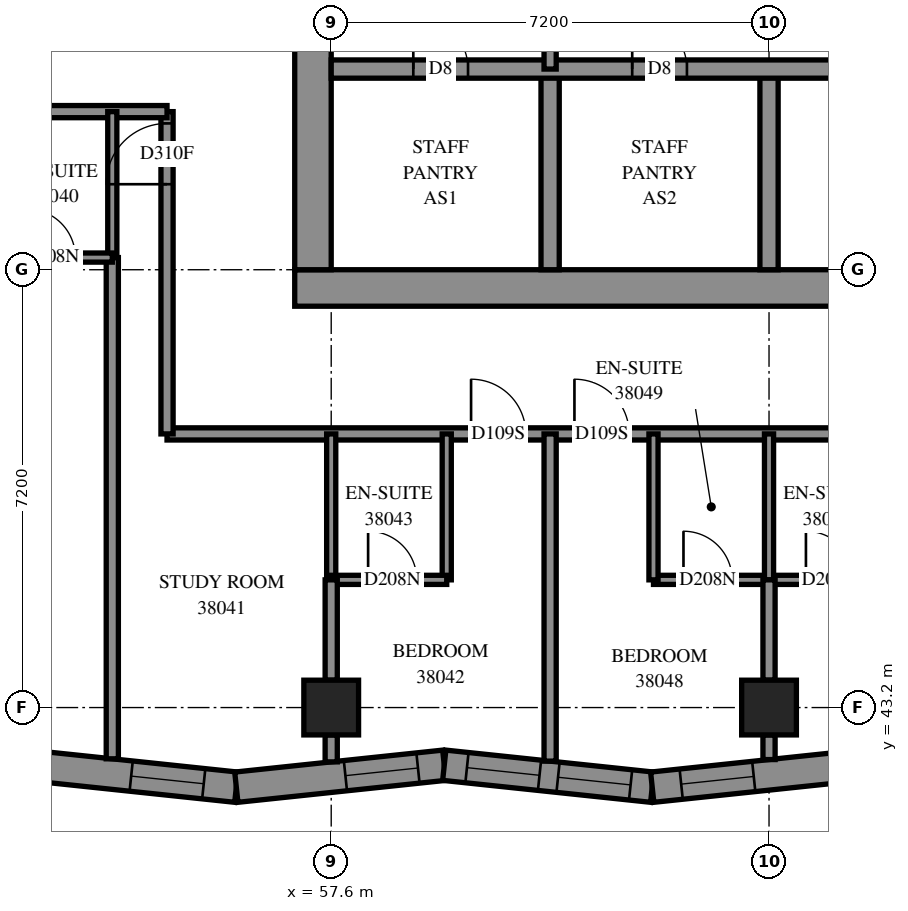
"""IFC4 building model, lengths in metres.
Left out: names, types, materials, properties, quantities, classifications, styles, units other than length and angle.
Written with IfcOpenShell. Run it as: python <this file> out.ifc"""

import sys

from ifc_helpers import new_model, si_unit, direction, frame, frame_2d, origin, origin_2d, place, context, subcontext, project, spatial, polyline, rectangle, outline, extrude, element, fill, save


model = new_model("IFC4")
c1 = context("Model", 3, precision=1e-05, world=origin(), true_north=direction((0.0, 1.0)))
c2 = subcontext(c1, "Body", "Model", "MODEL_VIEW")
j1 = project(units=[si_unit("LENGTHUNIT", "METRE"), si_unit("PLANEANGLEUNIT", "RADIAN")], contexts=[c1])
p1 = place(None, origin())
s1 = spatial("IfcSite", under=j1, at=p1, CompositionType="ELEMENT")
p2 = place(p1, origin())
s2 = spatial("IfcBuilding", under=s1, at=p2, CompositionType="ELEMENT")
p3 = place(p2, frame((0.0, 0.0, 142.2)))
s3 = spatial("IfcBuildingStorey", under=s2, at=p3, CompositionType="ELEMENT", Elevation=142.2)
for number, where, z_axis, x_axis in (
    (1, (57.6, 43.2, 0.0), (0.0, 0.0, 1.0), (1.0, 0.0, 0.0)),
    (2, (64.8, 43.2, 0.0), (0.0, 0.0, 1.0), (1.0, 0.0, 0.0)),
):
    element("IfcColumn", number, at=place(p3, frame(where, z_axis=z_axis, x_axis=x_axis)), inside=s3, PredefinedType="COLUMN", context=c2, shape_type="SweptSolid", body=[
        extrude(rectangle(XDim=0.9, YDim=0.9, at=origin_2d()), origin(), (0.0, 0.0, 1.0), 3.1),
    ])
p4 = place(p3, frame((57.0, 50.1, -0.3), z_axis=(0.0, 0.0, 1.0), x_axis=(1.0, 0.0, 0.0)))
e3 = element("IfcWall", 3, at=p4, inside=s3, PredefinedType="SHEAR", context=c2, shape_type="SweptSolid", body=[
    extrude(rectangle(XDim=15.6, YDim=0.6, at=frame_2d((7.8, 0.0))), origin(), (0.0, 0.0, 1.0), 2.7),
])
p5 = place(p3, frame((57.3, 50.4, -0.3), z_axis=(0.0, 0.0, 1.0), x_axis=(0.0, 1.0, 0.0)))
e4 = element("IfcWall", 4, at=p5, inside=s3, PredefinedType="SHEAR", context=c2, shape_type="SweptSolid", body=[
    extrude(rectangle(XDim=14.4, YDim=0.6, at=frame_2d((7.2, 0.0))), origin(), (0.0, 0.0, 1.0), 2.7),
])
p6 = place(p5, frame((4.55, 0.0, 0.3)))
e5 = element("IfcOpeningElement", 5, at=p6, cuts=e4, PredefinedType="OPENING", context=c2, shape_type="SweptSolid", body=[
    extrude(rectangle(XDim=1.1, YDim=2.1, at=frame_2d((0.55, 1.05))), frame((0.0, 0.31, 0.0), z_axis=(0.0, -1.0, 0.0), x_axis=(1.0, 0.0, 0.0)), (0.0, 0.0, 1.0), 0.62),
])
p7 = place(p5, frame((11.35, 0.0, 0.3)))
e6 = element("IfcOpeningElement", 6, at=p7, cuts=e4, PredefinedType="OPENING", context=c2, shape_type="SweptSolid", body=[
    extrude(rectangle(XDim=1.1, YDim=2.1, at=frame_2d((0.55, 1.05))), frame((0.0, 0.31, 0.0), z_axis=(0.0, -1.0, 0.0), x_axis=(1.0, 0.0, 0.0)), (0.0, 0.0, 1.0), 0.62),
])
for number, where, z_axis, x_axis in (
    (7, (61.2, 50.4, 0.0), (0.0, 0.0, 1.0), (0.0, 1.0, 0.0)),
    (8, (64.8, 50.4, 0.0), (0.0, 0.0, 1.0), (0.0, 1.0, 0.0)),
):
    element("IfcWall", number, at=place(p3, frame(where, z_axis=z_axis, x_axis=x_axis)), inside=s3, PredefinedType="SOLIDWALL", context=c2, shape_type="SweptSolid", body=[
        extrude(rectangle(XDim=3.3, YDim=0.3, at=frame_2d((1.65, 0.0))), origin(), (0.0, 0.0, 1.0), 3.1),
    ])
p8 = place(p3, frame((57.6, 53.7, 0.0), z_axis=(0.0, 0.0, 1.0), x_axis=(1.0, 0.0, 0.0)))
e9 = element("IfcWall", 9, at=p8, inside=s3, PredefinedType="SOLIDWALL", context=c2, shape_type="SweptSolid", body=[
    extrude(rectangle(XDim=14.4, YDim=0.3, at=frame_2d((7.2, 0.0))), origin(), (0.0, 0.0, 1.0), 3.1),
])
p9 = place(p8, frame((1.35, 0.0, 0.0)))
e10 = element("IfcOpeningElement", 10, at=p9, cuts=e9, PredefinedType="OPENING", context=c2, shape_type="SweptSolid", body=[
    extrude(rectangle(XDim=0.9, YDim=2.1, at=frame_2d((0.45, 1.05))), frame((0.0, 0.16, 0.0), z_axis=(0.0, -1.0, 0.0), x_axis=(1.0, 0.0, 0.0)), (0.0, 0.0, 1.0), 0.32),
])
p10 = place(p8, frame((4.95, 0.0, 0.0)))
e11 = element("IfcOpeningElement", 11, at=p10, cuts=e9, PredefinedType="OPENING", context=c2, shape_type="SweptSolid", body=[
    extrude(rectangle(XDim=0.9, YDim=2.1, at=frame_2d((0.45, 1.05))), frame((0.0, 0.16, 0.0), z_axis=(0.0, -1.0, 0.0), x_axis=(1.0, 0.0, 0.0)), (0.0, 0.0, 1.0), 0.32),
])
p11 = place(p8, frame((8.55, 0.0, 0.0)))
e12 = element("IfcOpeningElement", 12, at=p11, cuts=e9, PredefinedType="OPENING", context=c2, shape_type="SweptSolid", body=[
    extrude(rectangle(XDim=0.9, YDim=2.1, at=frame_2d((0.45, 1.05))), frame((0.0, 0.16, 0.0), z_axis=(0.0, -1.0, 0.0), x_axis=(1.0, 0.0, 0.0)), (0.0, 0.0, 1.0), 0.32),
])
p12 = place(p8, frame((12.05, 0.0, 0.0)))
e13 = element("IfcOpeningElement", 13, at=p12, cuts=e9, PredefinedType="OPENING", context=c2, shape_type="SweptSolid", body=[
    extrude(rectangle(XDim=1.1, YDim=2.1, at=frame_2d((0.55, 1.05))), frame((0.0, 0.16, 0.0), z_axis=(0.0, -1.0, 0.0), x_axis=(1.0, 0.0, 0.0)), (0.0, 0.0, 1.0), 0.32),
])
p13 = place(p3, frame((52.598, 42.254, 0.0), z_axis=(0.0, 0.0, 1.0), x_axis=(0.9944732608, -0.1049901591, 0.0)))
e14 = element("IfcWall", 14, at=p13, inside=s3, PredefinedType="SOLIDWALL", context=c2, shape_type="SweptSolid", body=[
    extrude(outline(polyline([(0.048, -0.25), (3.487, -0.25), (3.434, 0.25), (-0.048, 0.25), (0.048, -0.25)])), origin(), (0.0, 0.0, 1.0), 3.1),
])
p14 = place(p13, frame((1.722, 0.0, 0.45)))
e15 = element("IfcOpeningElement", 15, at=p14, cuts=e14, PredefinedType="OPENING", context=c2, shape_type="SweptSolid", body=[
    extrude(rectangle(XDim=1.2, YDim=2.5, at=frame_2d((0.6, 1.25))), frame((0.0, 0.26, 0.0), z_axis=(0.0, -1.0, 0.0), x_axis=(1.0, 0.0, 0.0)), (0.0, 0.0, 1.0), 0.52),
])
p15 = place(p3, frame((56.039, 41.89, 0.0), z_axis=(0.0, 0.0, 1.0), x_axis=(0.9944741767, 0.1049814831, 0.0)))
e16 = element("IfcWall", 16, at=p15, inside=s3, PredefinedType="SOLIDWALL", context=c2, shape_type="SweptSolid", body=[
    extrude(outline(polyline([(-0.026, -0.25), (3.412, -0.25), (3.465, 0.25), (0.026, 0.25), (-0.026, -0.25)])), origin(), (0.0, 0.0, 1.0), 3.1),
])
p16 = place(p15, frame((1.804, 0.0, 0.45)))
e17 = element("IfcOpeningElement", 17, at=p16, cuts=e16, PredefinedType="OPENING", context=c2, shape_type="SweptSolid", body=[
    extrude(rectangle(XDim=1.2, YDim=2.5, at=frame_2d((0.6, 1.25))), frame((0.0, 0.26, 0.0), z_axis=(0.0, -1.0, 0.0), x_axis=(1.0, 0.0, 0.0)), (0.0, 0.0, 1.0), 0.52),
])
p17 = place(p3, frame((59.459, 42.251, 0.0), z_axis=(0.0, 0.0, 1.0), x_axis=(0.9944741767, -0.1049814831, 0.0)))
e18 = element("IfcWall", 18, at=p17, inside=s3, PredefinedType="SOLIDWALL", context=c2, shape_type="SweptSolid", body=[
    extrude(outline(polyline([(0.026, -0.25), (3.465, -0.25), (3.412, 0.25), (-0.026, 0.25), (0.026, -0.25)])), origin(), (0.0, 0.0, 1.0), 3.1),
])
p18 = place(p17, frame((0.375, 0.0, 0.45)))
e19 = element("IfcOpeningElement", 19, at=p18, cuts=e18, PredefinedType="OPENING", context=c2, shape_type="SweptSolid", body=[
    extrude(rectangle(XDim=1.2, YDim=2.5, at=frame_2d((0.6, 1.25))), frame((0.0, 0.26, 0.0), z_axis=(0.0, -1.0, 0.0), x_axis=(1.0, 0.0, 0.0)), (0.0, 0.0, 1.0), 0.52),
])
p19 = place(p17, frame((1.881, 0.0, 0.45)))
e20 = element("IfcOpeningElement", 20, at=p19, cuts=e18, PredefinedType="OPENING", context=c2, shape_type="SweptSolid", body=[
    extrude(rectangle(XDim=1.2, YDim=2.5, at=frame_2d((0.6, 1.25))), frame((0.0, 0.26, 0.0), z_axis=(0.0, -1.0, 0.0), x_axis=(1.0, 0.0, 0.0)), (0.0, 0.0, 1.0), 0.52),
])
p20 = place(p3, frame((62.879, 41.89, 0.0), z_axis=(0.0, 0.0, 1.0), x_axis=(0.9944744972, 0.1049784471, 0.0)))
e21 = element("IfcWall", 21, at=p20, inside=s3, PredefinedType="SOLIDWALL", context=c2, shape_type="SweptSolid", body=[
    extrude(outline(polyline([(-0.026, -0.25), (3.412, -0.25), (3.465, 0.25), (0.026, 0.25), (-0.026, -0.25)])), origin(), (0.0, 0.0, 1.0), 3.1),
])
p21 = place(p20, frame((0.479, 0.0, 0.45)))
e22 = element("IfcOpeningElement", 22, at=p21, cuts=e21, PredefinedType="OPENING", context=c2, shape_type="SweptSolid", body=[
    extrude(rectangle(XDim=1.2, YDim=2.5, at=frame_2d((0.6, 1.25))), frame((0.0, 0.26, 0.0), z_axis=(0.0, -1.0, 0.0), x_axis=(1.0, 0.0, 0.0)), (0.0, 0.0, 1.0), 0.52),
])
p22 = place(p3, frame((61.2, 53.7, 0.0), z_axis=(0.0, 0.0, 1.0), x_axis=(0.0, 1.0, 0.0)))
e23 = element("IfcWall", 23, at=p22, inside=s3, PredefinedType="PARTITIONING", context=c2, shape_type="SweptSolid", body=[
    extrude(rectangle(XDim=3.6, YDim=0.2, at=frame_2d((1.8, 0.0))), origin(), (0.0, 0.0, 1.0), 3.1),
])
p23 = place(p3, frame((54.9, 47.7, 0.0), z_axis=(0.0, 0.0, 1.0), x_axis=(1.0, 0.0, 0.0)))
e24 = element("IfcWall", 24, at=p23, inside=s3, PredefinedType="PARTITIONING", context=c2, shape_type="SweptSolid", body=[
    extrude(rectangle(XDim=19.326, YDim=0.2, at=frame_2d((9.663, 0.0))), origin(), (0.0, 0.0, 1.0), 3.1),
])
p24 = place(p23, frame((5.0, 0.0, 0.0)))
e25 = element("IfcOpeningElement", 25, at=p24, cuts=e24, PredefinedType="OPENING", context=c2, shape_type="SweptSolid", body=[
    extrude(rectangle(XDim=0.9, YDim=2.1, at=frame_2d((0.45, 1.05))), frame((0.0, 0.11, 0.0), z_axis=(0.0, -1.0, 0.0), x_axis=(1.0, 0.0, 0.0)), (0.0, 0.0, 1.0), 0.22),
])
p25 = place(p23, frame((12.2, 0.0, 0.0)))
e26 = element("IfcOpeningElement", 26, at=p25, cuts=e24, PredefinedType="OPENING", context=c2, shape_type="SweptSolid", body=[
    extrude(rectangle(XDim=0.9, YDim=2.1, at=frame_2d((0.45, 1.05))), frame((0.0, 0.11, 0.0), z_axis=(0.0, -1.0, 0.0), x_axis=(1.0, 0.0, 0.0)), (0.0, 0.0, 1.0), 0.22),
])
p26 = place(p23, frame((6.7, 0.0, 0.0)))
e27 = element("IfcOpeningElement", 27, at=p26, cuts=e24, PredefinedType="OPENING", context=c2, shape_type="SweptSolid", body=[
    extrude(rectangle(XDim=0.9, YDim=2.1, at=frame_2d((0.45, 1.05))), frame((0.0, 0.11, 0.0), z_axis=(0.0, -1.0, 0.0), x_axis=(1.0, 0.0, 0.0)), (0.0, 0.0, 1.0), 0.22),
])
p27 = place(p23, frame((13.9, 0.0, 0.0)))
e28 = element("IfcOpeningElement", 28, at=p27, cuts=e24, PredefinedType="OPENING", context=c2, shape_type="SweptSolid", body=[
    extrude(rectangle(XDim=0.9, YDim=2.1, at=frame_2d((0.45, 1.05))), frame((0.0, 0.11, 0.0), z_axis=(0.0, -1.0, 0.0), x_axis=(1.0, 0.0, 0.0)), (0.0, 0.0, 1.0), 0.22),
])
p28 = place(p3, frame((54.0, 42.357, 0.0), z_axis=(0.0, 0.0, 1.0), x_axis=(0.0, 1.0, 0.0)))
e29 = element("IfcWall", 29, at=p28, inside=s3, PredefinedType="PARTITIONING", context=c2, shape_type="SweptSolid", body=[
    extrude(rectangle(XDim=8.243, YDim=0.2, at=frame_2d((4.122, 0.0))), origin(), (0.0, 0.0, 1.0), 3.1),
])
p29 = place(p3, frame((61.2, 42.319, 0.0), z_axis=(0.0, 0.0, 1.0), x_axis=(0.0, 1.0, 0.0)))
e30 = element("IfcWall", 30, at=p29, inside=s3, PredefinedType="PARTITIONING", context=c2, shape_type="SweptSolid", body=[
    extrude(rectangle(XDim=5.381, YDim=0.2, at=frame_2d((2.691, 0.0))), origin(), (0.0, 0.0, 1.0), 3.1),
])
p30 = place(p3, frame((54.9, 47.7, 0.0), z_axis=(0.0, 0.0, 1.0), x_axis=(0.0, 1.0, 0.0)))
e31 = element("IfcWall", 31, at=p30, inside=s3, PredefinedType="PARTITIONING", context=c2, shape_type="SweptSolid", body=[
    extrude(rectangle(XDim=5.3, YDim=0.2, at=frame_2d((2.65, 0.0))), origin(), (0.0, 0.0, 1.0), 3.1),
])
p31 = place(p30, frame((4.106, 0.0, 0.0)))
e32 = element("IfcOpeningElement", 32, at=p31, cuts=e31, PredefinedType="OPENING", context=c2, shape_type="SweptSolid", body=[
    extrude(rectangle(XDim=1.0, YDim=2.1, at=frame_2d((0.5, 1.05))), frame((0.0, 0.11, 0.0), z_axis=(0.0, -1.0, 0.0), x_axis=(1.0, 0.0, 0.0)), (0.0, 0.0, 1.0), 0.22),
])
p32 = place(p3, frame((50.4, 53.0, 0.0), z_axis=(0.0, 0.0, 1.0), x_axis=(1.0, 0.0, 0.0)))
e33 = element("IfcWall", 33, at=p32, inside=s3, PredefinedType="PARTITIONING", context=c2, shape_type="SweptSolid", body=[
    extrude(rectangle(XDim=4.5, YDim=0.2, at=frame_2d((2.25, 0.0))), origin(), (0.0, 0.0, 1.0), 3.1),
])
p33 = place(p32, frame((0.4, 0.0, 0.0)))
e34 = element("IfcOpeningElement", 34, at=p33, cuts=e33, PredefinedType="OPENING", context=c2, shape_type="SweptSolid", body=[
    extrude(rectangle(XDim=0.9, YDim=2.1, at=frame_2d((0.45, 1.05))), frame((0.0, 0.11, 0.0), z_axis=(0.0, -1.0, 0.0), x_axis=(1.0, 0.0, 0.0)), (0.0, 0.0, 1.0), 0.22),
])
p34 = place(p3, frame((62.9, 45.3, 0.0), z_axis=(0.0, 0.0, 1.0), x_axis=(1.0, 0.0, 0.0)))
e35 = element("IfcWall", 35, at=p34, inside=s3, PredefinedType="PARTITIONING", context=c2, shape_type="SweptSolid", body=[
    extrude(rectangle(XDim=3.8, YDim=0.15, at=frame_2d((1.9, 0.0))), origin(), (0.0, 0.0, 1.0), 3.1),
])
p35 = place(p34, frame((2.507, 0.0, 0.0)))
e36 = element("IfcOpeningElement", 36, at=p35, cuts=e35, PredefinedType="OPENING", context=c2, shape_type="SweptSolid", body=[
    extrude(rectangle(XDim=0.8, YDim=2.1, at=frame_2d((0.4, 1.05))), frame((0.0, 0.085, 0.0), z_axis=(0.0, -1.0, 0.0), x_axis=(1.0, 0.0, 0.0)), (0.0, 0.0, 1.0), 0.17),
])
p36 = place(p34, frame((0.493, 0.0, 0.0)))
e37 = element("IfcOpeningElement", 37, at=p36, cuts=e35, PredefinedType="OPENING", context=c2, shape_type="SweptSolid", body=[
    extrude(rectangle(XDim=0.8, YDim=2.1, at=frame_2d((0.4, 1.05))), frame((0.0, 0.085, 0.0), z_axis=(0.0, -1.0, 0.0), x_axis=(1.0, 0.0, 0.0)), (0.0, 0.0, 1.0), 0.17),
])
for number, where, z_axis, x_axis in (
    (38, (59.5, 45.3, 0.0), (0.0, 0.0, 1.0), (0.0, 1.0, 0.0)),
    (39, (57.6, 45.3, 0.0), (0.0, 0.0, 1.0), (0.0, 1.0, 0.0)),
    (40, (62.9, 45.3, 0.0), (0.0, 0.0, 1.0), (0.0, 1.0, 0.0)),
    (41, (64.8, 45.3, 0.0), (0.0, 0.0, 1.0), (0.0, 1.0, 0.0)),
    (42, (54.0, 50.6, 0.0), (0.0, 0.0, 1.0), (0.0, 1.0, 0.0)),
):
    element("IfcWall", number, at=place(p3, frame(where, z_axis=z_axis, x_axis=x_axis)), inside=s3, PredefinedType="PARTITIONING", context=c2, shape_type="SweptSolid", body=[
        extrude(rectangle(XDim=2.4, YDim=0.15, at=frame_2d((1.2, 0.0))), origin(), (0.0, 0.0, 1.0), 3.1),
    ])
p37 = place(p3, frame((52.1, 50.6, 0.0), z_axis=(0.0, 0.0, 1.0), x_axis=(1.0, 0.0, 0.0)))
e43 = element("IfcWall", 43, at=p37, inside=s3, PredefinedType="PARTITIONING", context=c2, shape_type="SweptSolid", body=[
    extrude(rectangle(XDim=1.9, YDim=0.15, at=frame_2d((0.95, 0.0))), origin(), (0.0, 0.0, 1.0), 3.1),
])
p38 = place(p37, frame((0.493, 0.0, 0.0)))
e44 = element("IfcOpeningElement", 44, at=p38, cuts=e43, PredefinedType="OPENING", context=c2, shape_type="SweptSolid", body=[
    extrude(rectangle(XDim=0.8, YDim=2.1, at=frame_2d((0.4, 1.05))), frame((0.0, 0.085, 0.0), z_axis=(0.0, -1.0, 0.0), x_axis=(1.0, 0.0, 0.0)), (0.0, 0.0, 1.0), 0.17),
])
p39 = place(p3, frame((57.6, 45.3, 0.0), z_axis=(0.0, 0.0, 1.0), x_axis=(1.0, 0.0, 0.0)))
e45 = element("IfcWall", 45, at=p39, inside=s3, PredefinedType="PARTITIONING", context=c2, shape_type="SweptSolid", body=[
    extrude(rectangle(XDim=1.9, YDim=0.15, at=frame_2d((0.95, 0.0))), origin(), (0.0, 0.0, 1.0), 3.1),
])
p40 = place(p39, frame((0.607, 0.0, 0.0)))
e46 = element("IfcOpeningElement", 46, at=p40, cuts=e45, PredefinedType="OPENING", context=c2, shape_type="SweptSolid", body=[
    extrude(rectangle(XDim=0.8, YDim=2.1, at=frame_2d((0.4, 1.05))), frame((0.0, 0.085, 0.0), z_axis=(0.0, -1.0, 0.0), x_axis=(1.0, 0.0, 0.0)), (0.0, 0.0, 1.0), 0.17),
])
for number, where, z_axis, x_axis in (
    (47, (57.6, 43.65, 0.0), (0.0, 0.0, 1.0), (0.0, 1.0, 0.0)),
    (48, (64.8, 43.65, 0.0), (0.0, 0.0, 1.0), (0.0, 1.0, 0.0)),
):
    element("IfcWall", number, at=place(p3, frame(where, z_axis=z_axis, x_axis=x_axis)), inside=s3, PredefinedType="PARTITIONING", context=c2, shape_type="SweptSolid", body=[
        extrude(rectangle(XDim=1.65, YDim=0.2, at=frame_2d((0.825, 0.0))), origin(), (0.0, 0.0, 1.0), 3.1),
    ])
p41 = place(p3, frame((57.6, 42.306, 0.0), z_axis=(0.0, 0.0, 1.0), x_axis=(0.0, 1.0, 0.0)))
e49 = element("IfcWall", 49, at=p41, inside=s3, PredefinedType="PARTITIONING", context=c2, shape_type="SweptSolid", body=[
    extrude(rectangle(XDim=0.444, YDim=0.2, at=frame_2d((0.222, 0.0))), origin(), (0.0, 0.0, 1.0), 3.1),
])
p42 = place(p3, frame((64.8, 42.345, 0.0), z_axis=(0.0, 0.0, 1.0), x_axis=(0.0, 1.0, 0.0)))
e50 = element("IfcWall", 50, at=p42, inside=s3, PredefinedType="PARTITIONING", context=c2, shape_type="SweptSolid", body=[
    extrude(rectangle(XDim=0.405, YDim=0.2, at=frame_2d((0.203, 0.0))), origin(), (0.0, 0.0, 1.0), 3.1),
])
p43 = place(p14, origin())
e51 = element("IfcWindow", 51, at=p43, inside=s3, PartitioningType="SINGLE_PANEL", PredefinedType="WINDOW", context=c2, shape_type="SweptSolid", body=[
    extrude(rectangle(XDim=1.2, YDim=2.5, at=frame_2d((0.6, 1.25))), frame((0.0, 0.18, 0.0), z_axis=(0.0, -1.0, 0.0), x_axis=(1.0, 0.0, 0.0)), (0.0, 0.0, 1.0), 0.06),
])
fill(e15, e51)
p44 = place(p16, origin())
e52 = element("IfcWindow", 52, at=p44, inside=s3, PartitioningType="SINGLE_PANEL", PredefinedType="WINDOW", context=c2, shape_type="SweptSolid", body=[
    extrude(rectangle(XDim=1.2, YDim=2.5, at=frame_2d((0.6, 1.25))), frame((0.0, 0.18, 0.0), z_axis=(0.0, -1.0, 0.0), x_axis=(1.0, 0.0, 0.0)), (0.0, 0.0, 1.0), 0.06),
])
fill(e17, e52)
p45 = place(p18, origin())
e53 = element("IfcWindow", 53, at=p45, inside=s3, PartitioningType="SINGLE_PANEL", PredefinedType="WINDOW", context=c2, shape_type="SweptSolid", body=[
    extrude(rectangle(XDim=1.2, YDim=2.5, at=frame_2d((0.6, 1.25))), frame((0.0, 0.18, 0.0), z_axis=(0.0, -1.0, 0.0), x_axis=(1.0, 0.0, 0.0)), (0.0, 0.0, 1.0), 0.06),
])
fill(e19, e53)
p46 = place(p19, origin())
e54 = element("IfcWindow", 54, at=p46, inside=s3, PartitioningType="SINGLE_PANEL", PredefinedType="WINDOW", context=c2, shape_type="SweptSolid", body=[
    extrude(rectangle(XDim=1.2, YDim=2.5, at=frame_2d((0.6, 1.25))), frame((0.0, 0.18, 0.0), z_axis=(0.0, -1.0, 0.0), x_axis=(1.0, 0.0, 0.0)), (0.0, 0.0, 1.0), 0.06),
])
fill(e20, e54)
p47 = place(p21, origin())
e55 = element("IfcWindow", 55, at=p47, inside=s3, PartitioningType="SINGLE_PANEL", PredefinedType="WINDOW", context=c2, shape_type="SweptSolid", body=[
    extrude(rectangle(XDim=1.2, YDim=2.5, at=frame_2d((0.6, 1.25))), frame((0.0, 0.18, 0.0), z_axis=(0.0, -1.0, 0.0), x_axis=(1.0, 0.0, 0.0)), (0.0, 0.0, 1.0), 0.06),
])
fill(e22, e55)
p48 = place(p9, origin())
e56 = element("IfcDoor", 56, at=p48, inside=s3, OperationType="SINGLE_SWING_LEFT", PredefinedType="DOOR", context=c2, shape_type="SweptSolid", body=[
    extrude(rectangle(XDim=0.9, YDim=2.1, at=frame_2d((0.45, 1.05))), frame((0.0, 0.025, 0.0), z_axis=(0.0, -1.0, 0.0), x_axis=(1.0, 0.0, 0.0)), (0.0, 0.0, 1.0), 0.05),
])
fill(e10, e56)
p49 = place(p10, origin())
e57 = element("IfcDoor", 57, at=p49, inside=s3, OperationType="SINGLE_SWING_LEFT", PredefinedType="DOOR", context=c2, shape_type="SweptSolid", body=[
    extrude(rectangle(XDim=0.9, YDim=2.1, at=frame_2d((0.45, 1.05))), frame((0.0, 0.025, 0.0), z_axis=(0.0, -1.0, 0.0), x_axis=(1.0, 0.0, 0.0)), (0.0, 0.0, 1.0), 0.05),
])
fill(e11, e57)
p50 = place(p38, origin())
e58 = element("IfcDoor", 58, at=p50, inside=s3, OperationType="SINGLE_SWING_RIGHT", PredefinedType="DOOR", context=c2, shape_type="SweptSolid", body=[
    extrude(rectangle(XDim=0.8, YDim=2.1, at=frame_2d((0.4, 1.05))), frame((0.0, 0.025, 0.0), z_axis=(0.0, -1.0, 0.0), x_axis=(1.0, 0.0, 0.0)), (0.0, 0.0, 1.0), 0.05),
])
fill(e44, e58)
p51 = place(p31, origin())
e59 = element("IfcDoor", 59, at=p51, inside=s3, OperationType="SINGLE_SWING_RIGHT", PredefinedType="DOOR", context=c2, shape_type="SweptSolid", body=[
    extrude(rectangle(XDim=1.0, YDim=2.1, at=frame_2d((0.5, 1.05))), frame((0.0, 0.025, 0.0), z_axis=(0.0, -1.0, 0.0), x_axis=(1.0, 0.0, 0.0)), (0.0, 0.0, 1.0), 0.05),
])
fill(e32, e59)
p52 = place(p24, origin())
e60 = element("IfcDoor", 60, at=p52, inside=s3, OperationType="SINGLE_SWING_LEFT", PredefinedType="DOOR", context=c2, shape_type="SweptSolid", body=[
    extrude(rectangle(XDim=0.9, YDim=2.1, at=frame_2d((0.45, 1.05))), frame((0.0, 0.025, 0.0), z_axis=(0.0, -1.0, 0.0), x_axis=(1.0, 0.0, 0.0)), (0.0, 0.0, 1.0), 0.05),
])
fill(e25, e60)
p53 = place(p40, origin())
e61 = element("IfcDoor", 61, at=p53, inside=s3, OperationType="SINGLE_SWING_RIGHT", PredefinedType="DOOR", context=c2, shape_type="SweptSolid", body=[
    extrude(rectangle(XDim=0.8, YDim=2.1, at=frame_2d((0.4, 1.05))), frame((0.0, 0.025, 0.0), z_axis=(0.0, -1.0, 0.0), x_axis=(1.0, 0.0, 0.0)), (0.0, 0.0, 1.0), 0.05),
])
fill(e46, e61)
p54 = place(p35, origin())
e62 = element("IfcDoor", 62, at=p54, inside=s3, OperationType="SINGLE_SWING_RIGHT", PredefinedType="DOOR", context=c2, shape_type="SweptSolid", body=[
    extrude(rectangle(XDim=0.8, YDim=2.1, at=frame_2d((0.4, 1.05))), frame((0.0, 0.025, 0.0), z_axis=(0.0, -1.0, 0.0), x_axis=(1.0, 0.0, 0.0)), (0.0, 0.0, 1.0), 0.05),
])
fill(e36, e62)
p55 = place(p26, origin())
e63 = element("IfcDoor", 63, at=p55, inside=s3, OperationType="SINGLE_SWING_RIGHT", PredefinedType="DOOR", context=c2, shape_type="SweptSolid", body=[
    extrude(rectangle(XDim=0.9, YDim=2.1, at=frame_2d((0.45, 1.05))), frame((0.0, 0.025, 0.0), z_axis=(0.0, -1.0, 0.0), x_axis=(1.0, 0.0, 0.0)), (0.0, 0.0, 1.0), 0.05),
])
fill(e27, e63)
p56 = place(p36, origin())
e64 = element("IfcDoor", 64, at=p56, inside=s3, OperationType="SINGLE_SWING_RIGHT", PredefinedType="DOOR", context=c2, shape_type="SweptSolid", body=[
    extrude(rectangle(XDim=0.8, YDim=2.1, at=frame_2d((0.4, 1.05))), frame((0.0, 0.025, 0.0), z_axis=(0.0, -1.0, 0.0), x_axis=(1.0, 0.0, 0.0)), (0.0, 0.0, 1.0), 0.05),
])
fill(e37, e64)
save(model, sys.argv[1])
